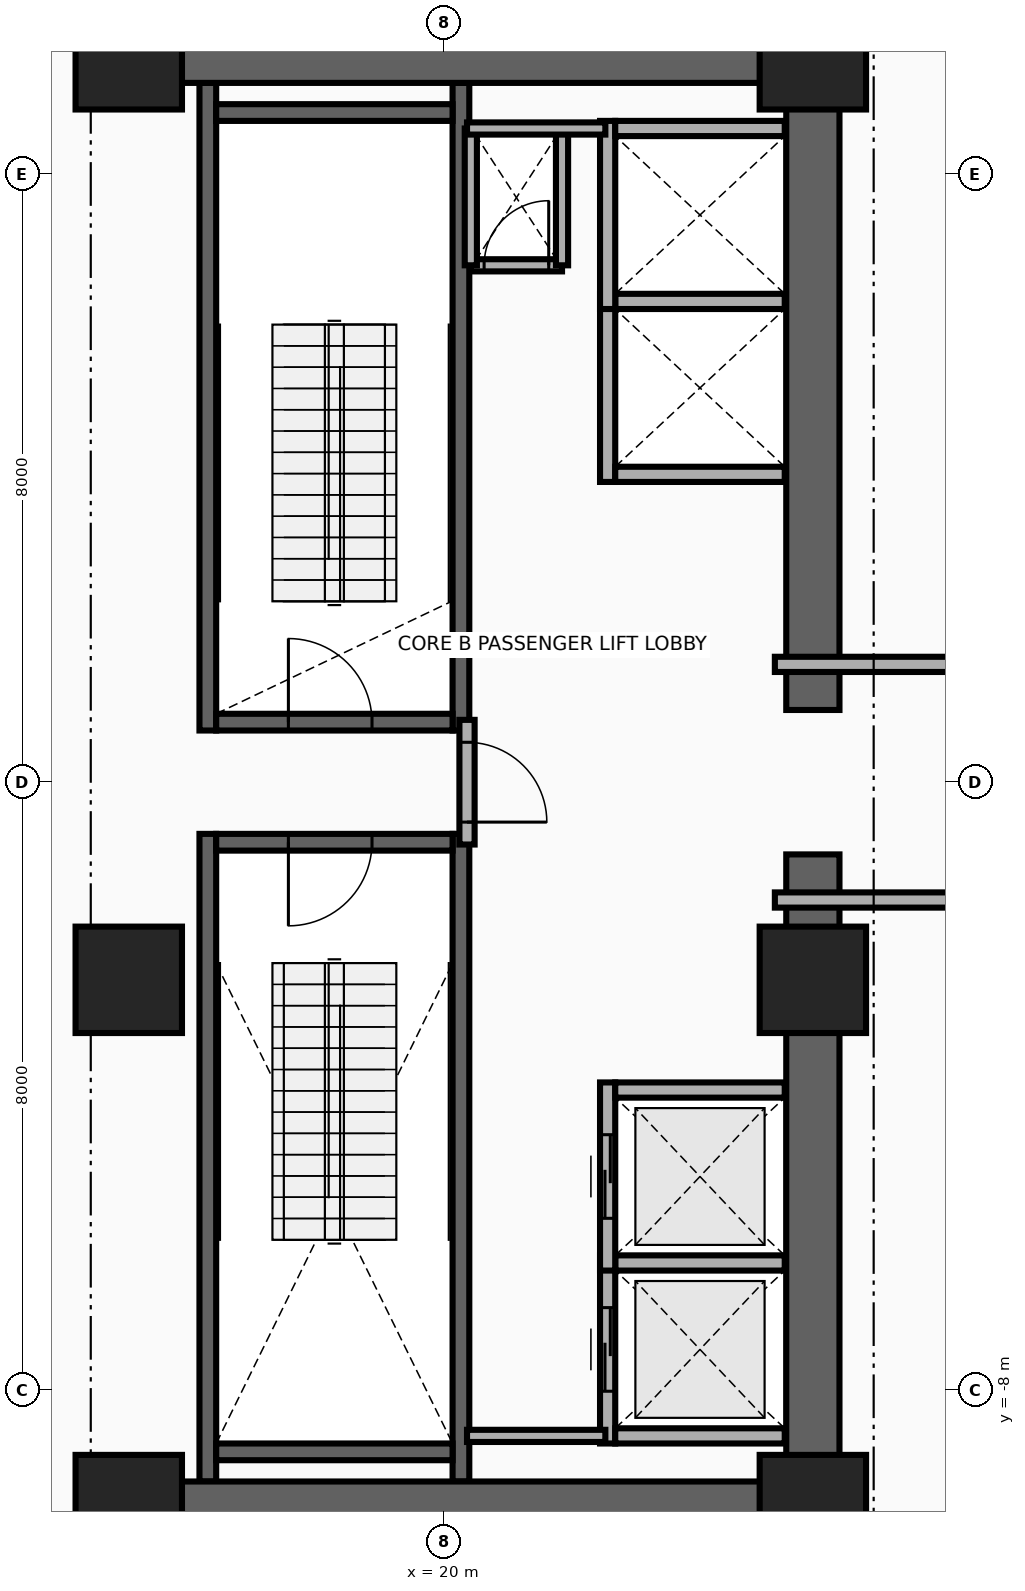
"""IFC4 building model, lengths in metres.
Left out: names, types, materials, properties, quantities, classifications, styles, units other than length and angle.
Written with IfcOpenShell. Run it as: python <this file> out.ifc"""

import sys

from ifc_helpers import new_model, si_unit, direction, frame, frame_2d, origin, origin_2d, place, context, subcontext, project, spatial, rectangle, extrude, source, transform, mapped, element, fill, save


model = new_model("IFC4")
c1 = context("Model", 3, precision=1e-05, world=origin(), true_north=direction((0.0, 1.0)))
c2 = subcontext(c1, "Body", "Model", "MODEL_VIEW")
j1 = project(units=[si_unit("LENGTHUNIT", "METRE"), si_unit("PLANEANGLEUNIT", "RADIAN")], contexts=[c1])
p1 = place(None, origin())
s1 = spatial("IfcSite", under=j1, at=p1, CompositionType="ELEMENT")
p2 = place(p1, origin())
s2 = spatial("IfcBuilding", under=s1, at=p2, CompositionType="ELEMENT")
p3 = place(p2, frame((0.0, 0.0, 96.3)))
s3 = spatial("IfcBuildingStorey", under=s2, at=p3, CompositionType="ELEMENT", Elevation=96.3)
for number, where, z_axis, x_axis in (
    (1, (16.89, 0.68, 0.0), (0.0, 0.0, 1.0), (0.0, 1.0, 0.0)),
    (2, (20.22, 0.68, 0.0), (0.0, 0.0, 1.0), (0.0, 1.0, 0.0)),
):
    element("IfcWall", number, at=place(p3, frame(where, z_axis=z_axis, x_axis=x_axis)), inside=s3, PredefinedType="SHEAR", context=c2, shape_type="SweptSolid", body=[
        extrude(rectangle(XDim=8.52, YDim=0.22, at=frame_2d((4.26, 0.0))), origin(), (0.0, 0.0, 1.0), 4.56),
    ])
p4 = place(p3, frame((17.0, 0.79, 0.0), z_axis=(0.0, 0.0, 1.0), x_axis=(1.0, 0.0, 0.0)))
e3 = element("IfcWall", 3, at=p4, inside=s3, PredefinedType="SHEAR", context=c2, shape_type="SweptSolid", body=[
    extrude(rectangle(XDim=3.11, YDim=0.22, at=frame_2d((1.555, 0.0))), origin(), (0.0, 0.0, 1.0), 4.56),
])
p5 = place(p4, frame((0.95, 0.0, 0.0)))
e4 = element("IfcOpeningElement", 4, at=p5, cuts=e3, PredefinedType="OPENING", context=c2, shape_type="SweptSolid", body=[
    extrude(rectangle(XDim=1.1, YDim=2.15, at=frame_2d((0.55, 1.075))), frame((0.0, 0.125, 0.0), z_axis=(0.0, -1.0, 0.0), x_axis=(1.0, 0.0, 0.0)), (0.0, 0.0, 1.0), 0.25),
])
p6 = place(p3, frame((17.0, 8.81, 0.0), z_axis=(0.0, 0.0, 1.0), x_axis=(1.0, 0.0, 0.0)))
e5 = element("IfcWall", 5, at=p6, inside=s3, PredefinedType="SHEAR", context=c2, shape_type="SweptSolid", body=[
    extrude(rectangle(XDim=3.11, YDim=0.22, at=frame_2d((1.555, 0.0))), origin(), (0.0, 0.0, 1.0), 4.56),
])
for number, where, z_axis, x_axis in (
    (6, (16.89, -9.2, 0.0), (0.0, 0.0, 1.0), (0.0, 1.0, 0.0)),
    (7, (20.22, -9.2, 0.0), (0.0, 0.0, 1.0), (0.0, 1.0, 0.0)),
):
    element("IfcWall", number, at=place(p3, frame(where, z_axis=z_axis, x_axis=x_axis)), inside=s3, PredefinedType="SHEAR", context=c2, shape_type="SweptSolid", body=[
        extrude(rectangle(XDim=8.52, YDim=0.22, at=frame_2d((4.26, 0.0))), origin(), (0.0, 0.0, 1.0), 4.56),
    ])
p7 = place(p3, frame((17.0, -8.81, 0.0), z_axis=(0.0, 0.0, 1.0), x_axis=(1.0, 0.0, 0.0)))
e8 = element("IfcWall", 8, at=p7, inside=s3, PredefinedType="SHEAR", context=c2, shape_type="SweptSolid", body=[
    extrude(rectangle(XDim=3.11, YDim=0.22, at=frame_2d((1.555, 0.0))), origin(), (0.0, 0.0, 1.0), 4.56),
])
p8 = place(p3, frame((17.0, -0.79, 0.0), z_axis=(0.0, 0.0, 1.0), x_axis=(1.0, 0.0, 0.0)))
e9 = element("IfcWall", 9, at=p8, inside=s3, PredefinedType="SHEAR", context=c2, shape_type="SweptSolid", body=[
    extrude(rectangle(XDim=3.11, YDim=0.22, at=frame_2d((1.555, 0.0))), origin(), (0.0, 0.0, 1.0), 4.56),
])
p9 = place(p8, frame((0.95, 0.0, 0.0)))
e10 = element("IfcOpeningElement", 10, at=p9, cuts=e9, PredefinedType="OPENING", context=c2, shape_type="SweptSolid", body=[
    extrude(rectangle(XDim=1.1, YDim=2.15, at=frame_2d((0.55, 1.075))), frame((0.0, 0.125, 0.0), z_axis=(0.0, -1.0, 0.0), x_axis=(1.0, 0.0, 0.0)), (0.0, 0.0, 1.0), 0.25),
])
for number, where, z_axis, x_axis in (
    (11, (24.85, -9.9, 0.0), (0.0, 0.0, 1.0), (0.0, 1.0, 0.0)),
    (12, (24.85, 0.95, 0.0), (0.0, 0.0, 1.0), (0.0, 1.0, 0.0)),
):
    element("IfcWall", number, at=place(p3, frame(where, z_axis=z_axis, x_axis=x_axis)), inside=s3, PredefinedType="SHEAR", context=c2, shape_type="SweptSolid", body=[
        extrude(rectangle(XDim=8.95, YDim=0.7, at=frame_2d((4.475, 0.0))), origin(), (0.0, 0.0, 1.0), 4.56),
    ])
for number, where, z_axis, x_axis in (
    (13, (15.85, 9.55, 0.0), (0.0, 0.0, 1.0), (1.0, 0.0, 0.0)),
    (14, (15.85, -9.55, 0.0), (0.0, 0.0, 1.0), (1.0, 0.0, 0.0)),
):
    element("IfcWall", number, at=place(p3, frame(where, z_axis=z_axis, x_axis=x_axis)), inside=s3, PredefinedType="SHEAR", context=c2, shape_type="SweptSolid", body=[
        extrude(rectangle(XDim=9.0, YDim=0.7, at=frame_2d((4.5, 0.0))), origin(), (0.0, 0.0, 1.0), 4.56),
    ])
m1 = source(origin(), c2, "Body", "SweptSolid", [
    extrude(rectangle(XDim=1.4, YDim=1.4, at=origin_2d()), origin(), (0.0, 0.0, 1.0), 4.8),
])
for number, where, z_axis, x_axis in (
    (15, (15.85, -9.55, 0.0), (0.0, 0.0, 1.0), (1.0, 0.0, 0.0)),
    (16, (24.85, -9.55, 0.0), (0.0, 0.0, 1.0), (1.0, 0.0, 0.0)),
    (17, (15.85, -2.6, 0.0), (0.0, 0.0, 1.0), (1.0, 0.0, 0.0)),
    (18, (24.85, -2.6, 0.0), (0.0, 0.0, 1.0), (1.0, 0.0, 0.0)),
    (19, (15.85, 9.55, 0.0), (0.0, 0.0, 1.0), (1.0, 0.0, 0.0)),
    (20, (24.85, 9.55, 0.0), (0.0, 0.0, 1.0), (1.0, 0.0, 0.0)),
):
    element("IfcColumn", number, at=place(p3, frame(where, z_axis=z_axis, x_axis=x_axis)), inside=s3, PredefinedType="COLUMN", context=c2, shape_type="MappedRepresentation", body=[
        mapped(m1, transform((0.0, 0.0, 0.0), x_axis=(1.0, 0.0, 0.0), y_axis=(0.0, 1.0, 0.0), z_axis=(0.0, 0.0, 1.0), scale=1.0)),
    ])
p10 = place(p3, frame((22.15, -8.7, 0.0), z_axis=(0.0, 0.0, 1.0), x_axis=(0.0, 1.0, 0.0)))
e21 = element("IfcWall", 21, at=p10, inside=s3, PredefinedType="MOVABLE", context=c2, shape_type="SweptSolid", body=[
    extrude(rectangle(XDim=2.475, YDim=0.2, at=frame_2d((1.237, 0.0))), origin(), (0.0, 0.0, 1.0), 4.56),
])
p11 = place(p10, frame((0.688, 0.0, 0.0)))
e22 = element("IfcOpeningElement", 22, at=p11, cuts=e21, PredefinedType="OPENING", context=c2, shape_type="SweptSolid", body=[
    extrude(rectangle(XDim=1.1, YDim=2.1, at=frame_2d((0.55, 1.05))), frame((0.0, 0.115, 0.0), z_axis=(0.0, -1.0, 0.0), x_axis=(1.0, 0.0, 0.0)), (0.0, 0.0, 1.0), 0.23),
])
for number, where, z_axis, x_axis in (
    (23, (22.25, -8.6, 0.0), (0.0, 0.0, 1.0), (1.0, 0.0, 0.0)),
    (24, (22.25, -6.325, 0.0), (0.0, 0.0, 1.0), (1.0, 0.0, 0.0)),
):
    element("IfcWall", number, at=place(p3, frame(where, z_axis=z_axis, x_axis=x_axis)), inside=s3, PredefinedType="MOVABLE", context=c2, shape_type="SweptSolid", body=[
        extrude(rectangle(XDim=2.23, YDim=0.2, at=frame_2d((1.115, 0.0))), origin(), (0.0, 0.0, 1.0), 4.56),
    ])
p12 = place(p3, frame((22.15, -6.425, 0.0), z_axis=(0.0, 0.0, 1.0), x_axis=(0.0, 1.0, 0.0)))
e25 = element("IfcWall", 25, at=p12, inside=s3, PredefinedType="MOVABLE", context=c2, shape_type="SweptSolid", body=[
    extrude(rectangle(XDim=2.475, YDim=0.2, at=frame_2d((1.238, 0.0))), origin(), (0.0, 0.0, 1.0), 4.56),
])
p13 = place(p12, frame((0.688, 0.0, 0.0)))
e26 = element("IfcOpeningElement", 26, at=p13, cuts=e25, PredefinedType="OPENING", context=c2, shape_type="SweptSolid", body=[
    extrude(rectangle(XDim=1.1, YDim=2.1, at=frame_2d((0.55, 1.05))), frame((0.0, 0.115, 0.0), z_axis=(0.0, -1.0, 0.0), x_axis=(1.0, 0.0, 0.0)), (0.0, 0.0, 1.0), 0.23),
])
p14 = place(p3, frame((22.25, -4.05, 0.0), z_axis=(0.0, 0.0, 1.0), x_axis=(1.0, 0.0, 0.0)))
e27 = element("IfcWall", 27, at=p14, inside=s3, PredefinedType="MOVABLE", context=c2, shape_type="SweptSolid", body=[
    extrude(rectangle(XDim=2.23, YDim=0.2, at=frame_2d((1.115, 0.0))), origin(), (0.0, 0.0, 1.0), 4.56),
])
p15 = place(p3, frame((22.15, 3.95, 0.0), z_axis=(0.0, 0.0, 1.0), x_axis=(0.0, 1.0, 0.0)))
e28 = element("IfcWall", 28, at=p15, inside=s3, PredefinedType="MOVABLE", context=c2, shape_type="SweptSolid", body=[
    extrude(rectangle(XDim=2.475, YDim=0.2, at=frame_2d((1.238, 0.0))), origin(), (0.0, 0.0, 1.0), 4.56),
])
for number, where, z_axis, x_axis in (
    (29, (22.25, 4.05, 0.0), (0.0, 0.0, 1.0), (1.0, 0.0, 0.0)),
    (30, (22.25, 6.325, 0.0), (0.0, 0.0, 1.0), (1.0, 0.0, 0.0)),
):
    element("IfcWall", number, at=place(p3, frame(where, z_axis=z_axis, x_axis=x_axis)), inside=s3, PredefinedType="MOVABLE", context=c2, shape_type="SweptSolid", body=[
        extrude(rectangle(XDim=2.23, YDim=0.2, at=frame_2d((1.115, 0.0))), origin(), (0.0, 0.0, 1.0), 3.345),
    ])
p16 = place(p3, frame((22.15, 6.225, 0.0), z_axis=(0.0, 0.0, 1.0), x_axis=(0.0, 1.0, 0.0)))
e31 = element("IfcWall", 31, at=p16, inside=s3, PredefinedType="MOVABLE", context=c2, shape_type="SweptSolid", body=[
    extrude(rectangle(XDim=2.475, YDim=0.2, at=frame_2d((1.237, 0.0))), origin(), (0.0, 0.0, 1.0), 4.56),
])
p17 = place(p3, frame((22.25, 8.6, 0.0), z_axis=(0.0, 0.0, 1.0), x_axis=(1.0, 0.0, 0.0)))
e32 = element("IfcWall", 32, at=p17, inside=s3, PredefinedType="MOVABLE", context=c2, shape_type="SweptSolid", body=[
    extrude(rectangle(XDim=2.23, YDim=0.2, at=frame_2d((1.115, 0.0))), origin(), (0.0, 0.0, 1.0), 3.345),
])
p18 = place(p3, frame((20.3, -0.82, 0.0), z_axis=(0.0, 0.0, 1.0), x_axis=(0.0, 1.0, 0.0)))
e33 = element("IfcWall", 33, at=p18, inside=s3, PredefinedType="PARTITIONING", context=c2, shape_type="SweptSolid", body=[
    extrude(rectangle(XDim=1.64, YDim=0.2, at=frame_2d((0.82, 0.0))), origin(), (0.0, 0.0, 1.0), 4.56),
])
p19 = place(p18, frame((0.295, 0.0, 0.0)))
e34 = element("IfcOpeningElement", 34, at=p19, cuts=e33, PredefinedType="OPENING", context=c2, shape_type="SweptSolid", body=[
    extrude(rectangle(XDim=1.05, YDim=2.15, at=frame_2d((0.525, 1.075))), frame((0.0, 0.115, 0.0), z_axis=(0.0, -1.0, 0.0), x_axis=(1.0, 0.0, 0.0)), (0.0, 0.0, 1.0), 0.23),
])
p20 = place(p3, frame((20.35, 6.8, 0.0), z_axis=(0.0, 0.0, 1.0), x_axis=(1.0, 0.0, 0.0)))
e35 = element("IfcWall", 35, at=p20, inside=s3, PredefinedType="PARTITIONING", context=c2, shape_type="SweptSolid", body=[
    extrude(rectangle(XDim=1.2, YDim=0.16, at=frame_2d((0.6, 0.0))), origin(), (0.0, 0.0, 1.0), 4.56),
])
p21 = place(p20, frame((0.175, 0.0, 0.0)))
e36 = element("IfcOpeningElement", 36, at=p21, cuts=e35, PredefinedType="OPENING", context=c2, shape_type="SweptSolid", body=[
    extrude(rectangle(XDim=0.85, YDim=2.05, at=frame_2d((0.425, 1.025))), frame((0.0, 0.095, 0.0), z_axis=(0.0, -1.0, 0.0), x_axis=(1.0, 0.0, 0.0)), (0.0, 0.0, 1.0), 0.19),
])
for number, where, z_axis, x_axis in (
    (37, (21.55, 6.8, 0.0), (0.0, 0.0, 1.0), (0.0, 1.0, 0.0)),
    (38, (20.35, 6.8, 0.0), (0.0, 0.0, 1.0), (0.0, 1.0, 0.0)),
):
    element("IfcWall", number, at=place(p3, frame(where, z_axis=z_axis, x_axis=x_axis)), inside=s3, PredefinedType="PARTITIONING", context=c2, shape_type="SweptSolid", body=[
        extrude(rectangle(XDim=1.8, YDim=0.16, at=frame_2d((0.9, 0.0))), origin(), (0.0, 0.0, 1.0), 4.56),
    ])
for number, where, z_axis, x_axis in (
    (39, (20.3, -8.6, 0.0), (0.0, 0.0, 1.0), (1.0, 0.0, 0.0)),
    (40, (20.3, 8.6, 0.0), (0.0, 0.0, 1.0), (1.0, 0.0, 0.0)),
):
    element("IfcWall", number, at=place(p3, frame(where, z_axis=z_axis, x_axis=x_axis)), inside=s3, PredefinedType="PARTITIONING", context=c2, shape_type="SweptSolid", body=[
        extrude(rectangle(XDim=1.82, YDim=0.16, at=frame_2d((0.91, 0.0))), origin(), (0.0, 0.0, 1.0), 4.56),
    ])
p22 = place(p3, frame((24.35, 1.55, 0.0), z_axis=(0.0, 0.0, 1.0), x_axis=(1.0, 0.0, 0.0)))
e41 = element("IfcWall", 41, at=p22, inside=s3, PredefinedType="PARTITIONING", context=c2, shape_type="SweptSolid", body=[
    extrude(rectangle(XDim=4.6, YDim=0.2, at=frame_2d((2.3, 0.0))), origin(), (0.0, 0.0, 1.0), 3.345),
])
p23 = place(p3, frame((24.35, -1.55, 0.0), z_axis=(0.0, 0.0, 1.0), x_axis=(1.0, 0.0, 0.0)))
e42 = element("IfcWall", 42, at=p23, inside=s3, PredefinedType="PARTITIONING", context=c2, shape_type="SweptSolid", body=[
    extrude(rectangle(XDim=6.45, YDim=0.2, at=frame_2d((3.225, 0.0))), origin(), (0.0, 0.0, 1.0), 3.345),
])
p24 = place(p11, origin())
e43 = element("IfcDoor", 43, at=p24, inside=s3, OperationType="DOUBLE_DOOR_SLIDING", PredefinedType="DOOR", context=c2, shape_type="SweptSolid", body=[
    extrude(rectangle(XDim=1.1, YDim=2.1, at=frame_2d((0.55, 1.05))), frame((0.0, 0.025, 0.0), z_axis=(0.0, -1.0, 0.0), x_axis=(1.0, 0.0, 0.0)), (0.0, 0.0, 1.0), 0.05),
])
fill(e22, e43)
p25 = place(p13, origin())
e44 = element("IfcDoor", 44, at=p25, inside=s3, OperationType="DOUBLE_DOOR_SLIDING", PredefinedType="DOOR", context=c2, shape_type="SweptSolid", body=[
    extrude(rectangle(XDim=1.1, YDim=2.1, at=frame_2d((0.55, 1.05))), frame((0.0, 0.025, 0.0), z_axis=(0.0, -1.0, 0.0), x_axis=(1.0, 0.0, 0.0)), (0.0, 0.0, 1.0), 0.05),
])
fill(e26, e44)
p26 = place(p19, frame((1.05, 0.0, 0.0), z_axis=(0.0, 0.0, 1.0), x_axis=(-1.0, 0.0, 0.0)))
e45 = element("IfcDoor", 45, at=p26, inside=s3, OperationType="SINGLE_SWING_LEFT", PredefinedType="DOOR", context=c2, shape_type="SweptSolid", body=[
    extrude(rectangle(XDim=1.05, YDim=2.15, at=frame_2d((0.525, 1.075))), frame((0.0, 0.025, 0.0), z_axis=(0.0, -1.0, 0.0), x_axis=(1.0, 0.0, 0.0)), (0.0, 0.0, 1.0), 0.05),
])
fill(e34, e45)
p27 = place(p5, origin())
e46 = element("IfcDoor", 46, at=p27, inside=s3, OperationType="SINGLE_SWING_RIGHT", PredefinedType="DOOR", context=c2, shape_type="SweptSolid", body=[
    extrude(rectangle(XDim=1.1, YDim=2.15, at=frame_2d((0.55, 1.075))), frame((0.0, 0.025, 0.0), z_axis=(0.0, -1.0, 0.0), x_axis=(1.0, 0.0, 0.0)), (0.0, 0.0, 1.0), 0.05),
])
fill(e4, e46)
p28 = place(p9, frame((1.1, 0.0, 0.0), z_axis=(0.0, 0.0, 1.0), x_axis=(-1.0, 0.0, 0.0)))
e47 = element("IfcDoor", 47, at=p28, inside=s3, OperationType="SINGLE_SWING_LEFT", PredefinedType="DOOR", context=c2, shape_type="SweptSolid", body=[
    extrude(rectangle(XDim=1.1, YDim=2.15, at=frame_2d((0.55, 1.075))), frame((0.0, 0.025, 0.0), z_axis=(0.0, -1.0, 0.0), x_axis=(1.0, 0.0, 0.0)), (0.0, 0.0, 1.0), 0.05),
])
fill(e10, e47)
p29 = place(p21, origin())
e48 = element("IfcDoor", 48, at=p29, inside=s3, OperationType="SINGLE_SWING_RIGHT", PredefinedType="DOOR", context=c2, shape_type="SweptSolid", body=[
    extrude(rectangle(XDim=0.85, YDim=2.05, at=frame_2d((0.425, 1.025))), frame((0.0, 0.025, 0.0), z_axis=(0.0, -1.0, 0.0), x_axis=(1.0, 0.0, 0.0)), (0.0, 0.0, 1.0), 0.05),
])
fill(e36, e48)
save(model, sys.argv[1])
